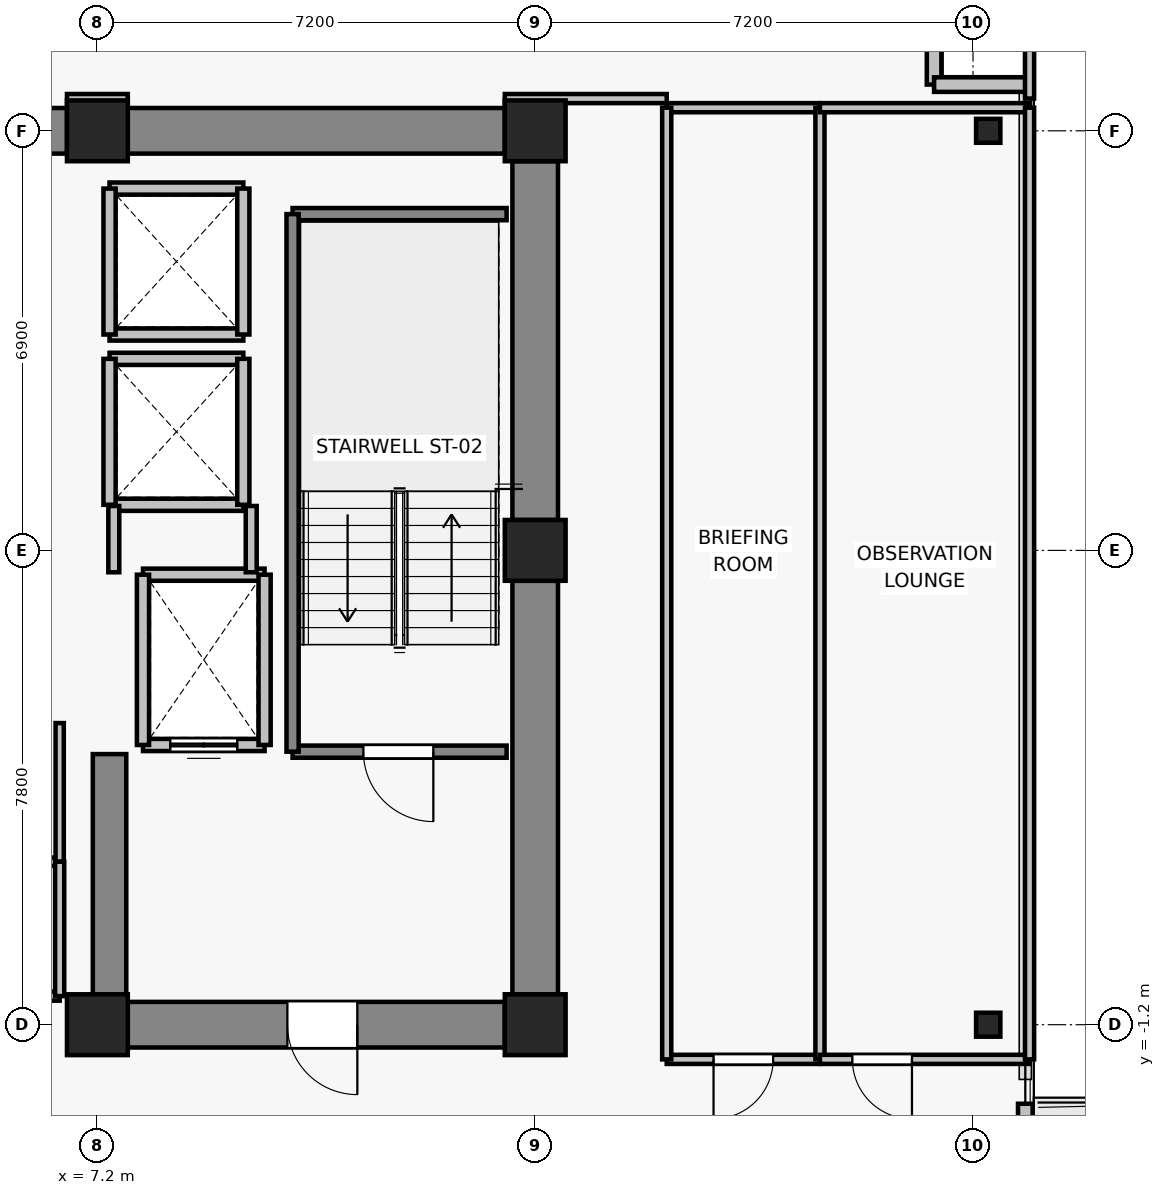
"""IFC4 building model, lengths in metres.
Left out: names, types, materials, properties, quantities, classifications, styles, units other than length and angle.
Written with IfcOpenShell. Run it as: python <this file> out.ifc"""

import sys

from ifc_helpers import new_model, si_unit, direction, frame, frame_2d, origin, origin_2d, place, context, subcontext, project, spatial, rectangle, i_section, extrude, source, transform, mapped, element, fill, save


model = new_model("IFC4")
c1 = context("Model", 3, precision=1e-05, world=origin(), true_north=direction((0.0, 1.0)))
c2 = subcontext(c1, "Body", "Model", "MODEL_VIEW")
j1 = project(units=[si_unit("LENGTHUNIT", "METRE"), si_unit("PLANEANGLEUNIT", "RADIAN")], contexts=[c1])
p1 = place(None, origin())
s1 = spatial("IfcSite", under=j1, at=p1, CompositionType="ELEMENT")
p2 = place(p1, origin())
s2 = spatial("IfcBuilding", under=s1, at=p2, CompositionType="ELEMENT")
p3 = place(p2, frame((0.0, 0.0, 149.5)))
s3 = spatial("IfcBuildingStorey", under=s2, at=p3, CompositionType="ELEMENT", Elevation=149.5)
for number, where, z_axis, x_axis in (
    (1, (7.2, -1.2, 0.0), (0.0, 0.0, 1.0), (1.0, 0.0, 0.0)),
    (2, (14.4, -1.2, 0.0), (0.0, 0.0, 1.0), (1.0, 0.0, 0.0)),
    (3, (14.4, 6.6, 0.0), (0.0, 0.0, 1.0), (1.0, 0.0, 0.0)),
    (4, (7.2, 13.5, 0.0), (0.0, 0.0, 1.0), (1.0, 0.0, 0.0)),
    (5, (14.4, 13.5, 0.0), (0.0, 0.0, 1.0), (1.0, 0.0, 0.0)),
):
    element("IfcColumn", number, at=place(p3, frame(where, z_axis=z_axis, x_axis=x_axis)), inside=s3, PredefinedType="COLUMN", context=c2, shape_type="SweptSolid", body=[
        extrude(rectangle(XDim=1.0, YDim=1.0, at=origin_2d()), origin(), (0.0, 0.0, 1.0), 3.3),
    ])
for number, where, z_axis, x_axis in (
    (6, (21.85, -1.2, 0.0), (0.0, 0.0, 1.0), (1.0, 0.0, 0.0)),
    (7, (21.85, 13.5, 0.0), (0.0, 0.0, 1.0), (1.0, 0.0, 0.0)),
):
    element("IfcColumn", number, at=place(p3, frame(where, z_axis=z_axis, x_axis=x_axis)), inside=s3, PredefinedType="COLUMN", context=c2, shape_type="SweptSolid", body=[
        extrude(i_section(OverallWidth=0.399, OverallDepth=0.394, WebThickness=0.023, FlangeThickness=0.037, FilletRadius=0.015, at=origin_2d()), origin(), (0.0, 0.0, 1.0), 3.3),
    ])
p4 = place(p3, frame((-6.7, 13.5, 0.0), z_axis=(0.0, 0.0, 1.0), x_axis=(1.0, 0.0, 0.0)))
e8 = element("IfcWall", 8, at=p4, inside=s3, PredefinedType="SHEAR", context=c2, shape_type="SweptSolid", body=[
    extrude(rectangle(XDim=13.4, YDim=0.75, at=frame_2d((6.7, 0.0))), origin(), (0.0, 0.0, 1.0), 3.075),
])
p5 = place(p3, frame((7.7, 13.5, 0.0), z_axis=(0.0, 0.0, 1.0), x_axis=(1.0, 0.0, 0.0)))
e9 = element("IfcWall", 9, at=p5, inside=s3, PredefinedType="SHEAR", context=c2, shape_type="SweptSolid", body=[
    extrude(rectangle(XDim=6.2, YDim=0.75, at=frame_2d((3.1, 0.0))), origin(), (0.0, 0.0, 1.0), 3.075),
])
p6 = place(p3, frame((14.4, -0.7, 0.0), z_axis=(0.0, 0.0, 1.0), x_axis=(0.0, 1.0, 0.0)))
e10 = element("IfcWall", 10, at=p6, inside=s3, PredefinedType="SHEAR", context=c2, shape_type="SweptSolid", body=[
    extrude(rectangle(XDim=6.8, YDim=0.75, at=frame_2d((3.4, 0.0))), origin(), (0.0, 0.0, 1.0), 3.075),
])
p7 = place(p3, frame((14.4, 7.1, 0.0), z_axis=(0.0, 0.0, 1.0), x_axis=(0.0, 1.0, 0.0)))
e11 = element("IfcWall", 11, at=p7, inside=s3, PredefinedType="SHEAR", context=c2, shape_type="SweptSolid", body=[
    extrude(rectangle(XDim=5.9, YDim=0.75, at=frame_2d((2.95, 0.0))), origin(), (0.0, 0.0, 1.0), 3.075),
])
p8 = place(p3, frame((13.9, -1.2, 0.0), z_axis=(0.0, 0.0, 1.0), x_axis=(-1.0, 0.0, 0.0)))
e12 = element("IfcWall", 12, at=p8, inside=s3, PredefinedType="SHEAR", context=c2, shape_type="SweptSolid", body=[
    extrude(rectangle(XDim=6.2, YDim=0.75, at=frame_2d((3.1, 0.0))), origin(), (0.0, 0.0, 1.0), 3.075),
])
p9 = place(p8, frame((2.425, 0.0, 0.0)))
e13 = element("IfcOpeningElement", 13, at=p9, cuts=e12, PredefinedType="OPENING", context=c2, shape_type="SweptSolid", body=[
    extrude(rectangle(XDim=1.15, YDim=2.15, at=frame_2d((0.575, 1.075))), frame((0.0, 0.385, 0.0), z_axis=(0.0, -1.0, 0.0), x_axis=(1.0, 0.0, 0.0)), (0.0, 0.0, 1.0), 0.77),
])
p10 = place(p3, frame((7.4, -0.825, 0.0), z_axis=(0.0, 0.0, 1.0), x_axis=(0.0, 1.0, 0.0)))
e14 = element("IfcWall", 14, at=p10, inside=s3, PredefinedType="SHEAR", context=c2, shape_type="SweptSolid", body=[
    extrude(rectangle(XDim=4.075, YDim=0.55, at=frame_2d((2.038, 0.0))), origin(), (0.0, 0.0, 1.0), 3.075),
])
p11 = place(p3, frame((22.46, -2.5, 0.0), z_axis=(0.0, 0.0, 1.0), x_axis=(0.0, -1.0, 0.0)))
e15 = element("IfcWall", 15, at=p11, inside=s3, PredefinedType="SOLIDWALL", context=c2, shape_type="SweptSolid", body=[
    extrude(rectangle(XDim=5.8, YDim=0.24, at=frame_2d((2.9, 0.0))), origin(), (0.0, 0.0, 1.0), 3.075),
])
p12 = place(p11, frame((1.566, 0.0, 0.0)))
e16 = element("IfcOpeningElement", 16, at=p12, cuts=e15, PredefinedType="OPENING", context=c2, shape_type="SweptSolid", body=[
    extrude(rectangle(XDim=1.0, YDim=2.2, at=frame_2d((0.5, 1.1))), frame((0.0, 0.13, 0.0), z_axis=(0.0, -1.0, 0.0), x_axis=(1.0, 0.0, 0.0)), (0.0, 0.0, 1.0), 0.26),
])
p13 = place(p11, frame((2.916, 0.0, 0.85)))
e17 = element("IfcOpeningElement", 17, at=p13, cuts=e15, PredefinedType="OPENING", context=c2, shape_type="SweptSolid", body=[
    extrude(rectangle(XDim=1.2, YDim=1.5, at=frame_2d((0.6, 0.75))), frame((0.0, 0.13, 0.0), z_axis=(0.0, -1.0, 0.0), x_axis=(1.0, 0.0, 0.0)), (0.0, 0.0, 1.0), 0.26),
])
for number, where, z_axis, x_axis in (
    (18, (20.96, 14.26, 0.0), (0.0, 0.0, 1.0), (0.0, 1.0, 0.0)),
    (19, (22.46, 14.26, 0.0), (0.0, 0.0, 1.0), (-1.0, 0.0, 0.0)),
):
    element("IfcWall", number, at=place(p3, frame(where, z_axis=z_axis, x_axis=x_axis)), inside=s3, PredefinedType="SOLIDWALL", context=c2, shape_type="SweptSolid", body=[
        extrude(rectangle(XDim=1.5, YDim=0.24, at=frame_2d((0.75, 0.0))), origin(), (0.0, 0.0, 1.0), 3.075),
    ])
p14 = place(p3, frame((9.95, 3.4, 0.0), z_axis=(0.0, 0.0, 1.0), x_axis=(-1.0, 0.0, 0.0)))
e20 = element("IfcWall", 20, at=p14, inside=s3, PredefinedType="SOLIDWALL", context=c2, shape_type="SweptSolid", body=[
    extrude(rectangle(XDim=2.0, YDim=0.2, at=frame_2d((1.0, 0.0))), origin(), (0.0, 0.0, 1.0), 3.075),
])
p15 = place(p14, frame((0.45, 0.0, 0.0)))
e21 = element("IfcOpeningElement", 21, at=p15, cuts=e20, PredefinedType="OPENING", context=c2, shape_type="SweptSolid", body=[
    extrude(rectangle(XDim=1.1, YDim=2.2, at=frame_2d((0.55, 1.1))), frame((0.0, 0.11, 0.0), z_axis=(0.0, -1.0, 0.0), x_axis=(1.0, 0.0, 0.0)), (0.0, 0.0, 1.0), 0.22),
])
p16 = place(p3, frame((7.95, 6.2, 0.0), z_axis=(0.0, 0.0, 1.0), x_axis=(1.0, 0.0, 0.0)))
e22 = element("IfcWall", 22, at=p16, inside=s3, PredefinedType="SOLIDWALL", context=c2, shape_type="SweptSolid", body=[
    extrude(rectangle(XDim=2.0, YDim=0.2, at=frame_2d((1.0, 0.0))), origin(), (0.0, 0.0, 1.0), 3.075),
])
for number, where, z_axis, x_axis in (
    (23, (7.95, 3.4, 0.0), (0.0, 0.0, 1.0), (0.0, 1.0, 0.0)),
    (24, (9.95, 6.2, 0.0), (0.0, 0.0, 1.0), (0.0, -1.0, 0.0)),
):
    element("IfcWall", number, at=place(p3, frame(where, z_axis=z_axis, x_axis=x_axis)), inside=s3, PredefinedType="SOLIDWALL", context=c2, shape_type="SweptSolid", body=[
        extrude(rectangle(XDim=2.8, YDim=0.2, at=frame_2d((1.4, 0.0))), origin(), (0.0, 0.0, 1.0), 3.075),
    ])
for number, where, z_axis, x_axis in (
    (25, (9.6, 7.35, 0.0), (0.0, 0.0, 1.0), (-1.0, 0.0, 0.0)),
    (26, (7.4, 9.75, 0.0), (0.0, 0.0, 1.0), (1.0, 0.0, 0.0)),
):
    element("IfcWall", number, at=place(p3, frame(where, z_axis=z_axis, x_axis=x_axis)), inside=s3, PredefinedType="SOLIDWALL", context=c2, shape_type="SweptSolid", body=[
        extrude(rectangle(XDim=2.2, YDim=0.2, at=frame_2d((1.1, 0.0))), origin(), (0.0, 0.0, 1.0), 2.565),
    ])
p17 = place(p3, frame((7.4, 7.35, 0.0), z_axis=(0.0, 0.0, 1.0), x_axis=(0.0, 1.0, 0.0)))
e27 = element("IfcWall", 27, at=p17, inside=s3, PredefinedType="SOLIDWALL", context=c2, shape_type="SweptSolid", body=[
    extrude(rectangle(XDim=2.4, YDim=0.2, at=frame_2d((1.2, 0.0))), origin(), (0.0, 0.0, 1.0), 2.565),
])
p18 = place(p3, frame((9.6, 9.75, 0.0), z_axis=(0.0, 0.0, 1.0), x_axis=(0.0, -1.0, 0.0)))
e28 = element("IfcWall", 28, at=p18, inside=s3, PredefinedType="SOLIDWALL", context=c2, shape_type="SweptSolid", body=[
    extrude(rectangle(XDim=2.4, YDim=0.2, at=frame_2d((1.2, 0.0))), origin(), (0.0, 0.0, 1.0), 3.075),
])
for number, where, z_axis, x_axis in (
    (29, (9.6, 10.15, 0.0), (0.0, 0.0, 1.0), (-1.0, 0.0, 0.0)),
    (30, (7.4, 12.55, 0.0), (0.0, 0.0, 1.0), (1.0, 0.0, 0.0)),
):
    element("IfcWall", number, at=place(p3, frame(where, z_axis=z_axis, x_axis=x_axis)), inside=s3, PredefinedType="SOLIDWALL", context=c2, shape_type="SweptSolid", body=[
        extrude(rectangle(XDim=2.2, YDim=0.2, at=frame_2d((1.1, 0.0))), origin(), (0.0, 0.0, 1.0), 2.565),
    ])
p19 = place(p3, frame((7.4, 10.15, 0.0), z_axis=(0.0, 0.0, 1.0), x_axis=(0.0, 1.0, 0.0)))
e31 = element("IfcWall", 31, at=p19, inside=s3, PredefinedType="SOLIDWALL", context=c2, shape_type="SweptSolid", body=[
    extrude(rectangle(XDim=2.4, YDim=0.2, at=frame_2d((1.2, 0.0))), origin(), (0.0, 0.0, 1.0), 2.565),
])
p20 = place(p3, frame((9.6, 12.55, 0.0), z_axis=(0.0, 0.0, 1.0), x_axis=(0.0, -1.0, 0.0)))
e32 = element("IfcWall", 32, at=p20, inside=s3, PredefinedType="SOLIDWALL", context=c2, shape_type="SweptSolid", body=[
    extrude(rectangle(XDim=2.4, YDim=0.2, at=frame_2d((1.2, 0.0))), origin(), (0.0, 0.0, 1.0), 3.075),
])
p21 = place(p3, frame((13.93, 3.29, 0.0), z_axis=(0.0, 0.0, 1.0), x_axis=(-1.0, 0.0, 0.0)))
e33 = element("IfcWall", 33, at=p21, inside=s3, PredefinedType="SOLIDWALL", context=c2, shape_type="SweptSolid", body=[
    extrude(rectangle(XDim=3.52, YDim=0.2, at=frame_2d((1.76, 0.0))), origin(), (0.0, 0.0, 1.0), 3.075),
])
p22 = place(p21, frame((1.205, 0.0, 0.0)))
e34 = element("IfcOpeningElement", 34, at=p22, cuts=e33, PredefinedType="OPENING", context=c2, shape_type="SweptSolid", body=[
    extrude(rectangle(XDim=1.15, YDim=2.15, at=frame_2d((0.575, 1.075))), frame((0.0, 0.11, 0.0), z_axis=(0.0, -1.0, 0.0), x_axis=(1.0, 0.0, 0.0)), (0.0, 0.0, 1.0), 0.22),
])
p23 = place(p3, frame((10.41, 12.13, 0.0), z_axis=(0.0, 0.0, 1.0), x_axis=(1.0, 0.0, 0.0)))
e35 = element("IfcWall", 35, at=p23, inside=s3, PredefinedType="SOLIDWALL", context=c2, shape_type="SweptSolid", body=[
    extrude(rectangle(XDim=3.52, YDim=0.2, at=frame_2d((1.76, 0.0))), origin(), (0.0, 0.0, 1.0), 3.075),
])
p24 = place(p3, frame((10.41, 3.29, 0.0), z_axis=(0.0, 0.0, 1.0), x_axis=(0.0, 1.0, 0.0)))
e36 = element("IfcWall", 36, at=p24, inside=s3, PredefinedType="SOLIDWALL", context=c2, shape_type="SweptSolid", body=[
    extrude(rectangle(XDim=8.84, YDim=0.2, at=frame_2d((4.42, 0.0))), origin(), (0.0, 0.0, 1.0), 3.075),
])
p25 = place(p3, frame((7.47, 6.24, 0.0), z_axis=(0.0, 0.0, 1.0), x_axis=(0.0, 1.0, 0.0)))
e37 = element("IfcWall", 37, at=p25, inside=s3, PredefinedType="PARTITIONING", context=c2, shape_type="SweptSolid", body=[
    extrude(rectangle(XDim=1.09, YDim=0.18, at=frame_2d((0.545, 0.0))), origin(), (0.0, 0.0, 1.0), 2.565),
])
p26 = place(p3, frame((9.73, 7.33, 0.0), z_axis=(0.0, 0.0, 1.0), x_axis=(0.0, -1.0, 0.0)))
e38 = element("IfcWall", 38, at=p26, inside=s3, PredefinedType="PARTITIONING", context=c2, shape_type="SweptSolid", body=[
    extrude(rectangle(XDim=1.09, YDim=0.18, at=frame_2d((0.545, 0.0))), origin(), (0.0, 0.0, 1.0), 3.075),
])
p27 = place(p3, frame((6.58, 1.48, 0.0), z_axis=(0.0, 0.0, 1.0), x_axis=(-1.0, 0.0, 0.0)))
e39 = element("IfcWall", 39, at=p27, inside=s3, PredefinedType="PARTITIONING", context=c2, shape_type="SweptSolid", body=[
    extrude(rectangle(XDim=5.11, YDim=0.135, at=frame_2d((2.555, 0.0))), origin(), (0.0, 0.0, 1.0), 3.075),
])
p28 = place(p3, frame((6.58, 3.76, 0.0), z_axis=(0.0, 0.0, 1.0), x_axis=(0.0, -1.0, 0.0)))
e40 = element("IfcWall", 40, at=p28, inside=s3, PredefinedType="PARTITIONING", context=c2, shape_type="SweptSolid", body=[
    extrude(rectangle(XDim=2.28, YDim=0.135, at=frame_2d((1.14, 0.0))), origin(), (0.0, 0.0, 1.0), 3.075),
])
p29 = place(p3, frame((6.58, -0.73, 0.0), z_axis=(0.0, 0.0, 1.0), x_axis=(-1.0, 0.0, 0.0)))
e41 = element("IfcWall", 41, at=p29, inside=s3, PredefinedType="PARTITIONING", context=c2, shape_type="SweptSolid", body=[
    extrude(rectangle(XDim=2.4, YDim=0.15, at=frame_2d((1.2, 0.0))), origin(), (0.0, 0.0, 1.0), 3.075),
])
p30 = place(p29, frame((0.76, 0.0, 0.0)))
e42 = element("IfcOpeningElement", 42, at=p30, cuts=e41, PredefinedType="OPENING", context=c2, shape_type="SweptSolid", body=[
    extrude(rectangle(XDim=0.88, YDim=2.1, at=frame_2d((0.44, 1.05))), frame((0.0, 0.085, 0.0), z_axis=(0.0, -1.0, 0.0), x_axis=(1.0, 0.0, 0.0)), (0.0, 0.0, 1.0), 0.17),
])
p31 = place(p3, frame((6.58, 1.48, 0.0), z_axis=(0.0, 0.0, 1.0), x_axis=(0.0, -1.0, 0.0)))
e43 = element("IfcWall", 43, at=p31, inside=s3, PredefinedType="PARTITIONING", context=c2, shape_type="SweptSolid", body=[
    extrude(rectangle(XDim=2.21, YDim=0.15, at=frame_2d((1.105, 0.0))), origin(), (0.0, 0.0, 1.0), 3.075),
])
p32 = place(p3, frame((19.083, -1.77, 0.0), z_axis=(0.0, 0.0, 1.0), x_axis=(-1.0, 0.0, 0.0)))
e44 = element("IfcWall", 44, at=p32, inside=s3, PredefinedType="PARTITIONING", context=c2, shape_type="SweptSolid", body=[
    extrude(rectangle(XDim=2.52, YDim=0.15, at=frame_2d((1.26, 0.0))), origin(), (0.0, 0.0, 1.0), 3.075),
])
p33 = place(p32, frame((0.77, 0.0, 0.0)))
e45 = element("IfcOpeningElement", 45, at=p33, cuts=e44, PredefinedType="OPENING", context=c2, shape_type="SweptSolid", body=[
    extrude(rectangle(XDim=0.98, YDim=2.15, at=frame_2d((0.49, 1.075))), frame((0.0, 0.085, 0.0), z_axis=(0.0, -1.0, 0.0), x_axis=(1.0, 0.0, 0.0)), (0.0, 0.0, 1.0), 0.17),
])
p34 = place(p3, frame((16.563, 13.88, 0.0), z_axis=(0.0, 0.0, 1.0), x_axis=(1.0, 0.0, 0.0)))
e46 = element("IfcWall", 46, at=p34, inside=s3, PredefinedType="PARTITIONING", context=c2, shape_type="SweptSolid", body=[
    extrude(rectangle(XDim=2.52, YDim=0.15, at=frame_2d((1.26, 0.0))), origin(), (0.0, 0.0, 1.0), 3.075),
])
for number, where, z_axis, x_axis in (
    (47, (16.563, -1.77, 0.0), (0.0, 0.0, 1.0), (0.0, 1.0, 0.0)),
    (48, (19.083, 13.88, 0.0), (0.0, 0.0, 1.0), (0.0, -1.0, 0.0)),
):
    element("IfcWall", number, at=place(p3, frame(where, z_axis=z_axis, x_axis=x_axis)), inside=s3, PredefinedType="PARTITIONING", context=c2, shape_type="SweptSolid", body=[
        extrude(rectangle(XDim=15.65, YDim=0.15, at=frame_2d((7.825, 0.0))), origin(), (0.0, 0.0, 1.0), 2.565),
    ])
p35 = place(p3, frame((22.53, -1.77, 0.0), z_axis=(0.0, 0.0, 1.0), x_axis=(-1.0, 0.0, 0.0)))
e49 = element("IfcWall", 49, at=p35, inside=s3, PredefinedType="PARTITIONING", context=c2, shape_type="SweptSolid", body=[
    extrude(rectangle(XDim=3.447, YDim=0.15, at=frame_2d((1.724, 0.0))), origin(), (0.0, 0.0, 1.0), 2.565),
])
p36 = place(p35, frame((1.934, 0.0, 0.0)))
e50 = element("IfcOpeningElement", 50, at=p36, cuts=e49, PredefinedType="OPENING", context=c2, shape_type="SweptSolid", body=[
    extrude(rectangle(XDim=0.98, YDim=2.15, at=frame_2d((0.49, 1.075))), frame((0.0, 0.085, 0.0), z_axis=(0.0, -1.0, 0.0), x_axis=(1.0, 0.0, 0.0)), (0.0, 0.0, 1.0), 0.17),
])
p37 = place(p3, frame((19.083, 13.88, 0.0), z_axis=(0.0, 0.0, 1.0), x_axis=(1.0, 0.0, 0.0)))
e51 = element("IfcWall", 51, at=p37, inside=s3, PredefinedType="PARTITIONING", context=c2, shape_type="SweptSolid", body=[
    extrude(rectangle(XDim=3.447, YDim=0.15, at=frame_2d((1.724, 0.0))), origin(), (0.0, 0.0, 1.0), 3.075),
])
p38 = place(p3, frame((22.53, 13.88, 0.0), z_axis=(0.0, 0.0, 1.0), x_axis=(0.0, -1.0, 0.0)))
e52 = element("IfcWall", 52, at=p38, inside=s3, PredefinedType="PARTITIONING", context=c2, shape_type="SweptSolid", body=[
    extrude(rectangle(XDim=15.65, YDim=0.15, at=frame_2d((7.825, 0.0))), origin(), (0.0, 0.0, 1.0), 3.075),
])
p39 = place(p3, frame((7.7, 14.03, 0.0), z_axis=(0.0, 0.0, 1.0), x_axis=(-1.0, 0.0, 0.0)))
e53 = element("IfcWall", 53, at=p39, inside=s3, PredefinedType="PARTITIONING", context=c2, shape_type="SweptSolid", body=[
    extrude(rectangle(XDim=1.0, YDim=0.15, at=frame_2d((0.5, 0.0))), origin(), (0.0, 0.0, 1.0), 2.565),
])
p40 = place(p3, frame((16.563, 14.03, 0.0), z_axis=(0.0, 0.0, 1.0), x_axis=(-1.0, 0.0, 0.0)))
e54 = element("IfcWall", 54, at=p40, inside=s3, PredefinedType="PARTITIONING", context=c2, shape_type="SweptSolid", body=[
    extrude(rectangle(XDim=2.663, YDim=0.15, at=frame_2d((1.332, 0.0))), origin(), (0.0, 0.0, 1.0), 2.565),
])
p41 = place(p3, frame((22.53, 17.33, 0.0), z_axis=(0.0, 0.0, 1.0), x_axis=(0.0, -1.0, 0.0)))
e55 = element("IfcWall", 55, at=p41, inside=s3, PredefinedType="PARTITIONING", context=c2, shape_type="SweptSolid", body=[
    extrude(rectangle(XDim=3.3, YDim=0.15, at=frame_2d((1.65, 0.0))), origin(), (0.0, 0.0, 1.0), 3.075),
])
m1 = source(origin(), c2, "Body", "SweptSolid", [
    extrude(rectangle(XDim=1.1, YDim=2.2, at=frame_2d((0.55, 1.1))), frame((0.0, 0.025, 0.0), z_axis=(0.0, -1.0, 0.0), x_axis=(1.0, 0.0, 0.0)), (0.0, 0.0, 1.0), 0.05),
])
p42 = place(p15, origin())
e56 = element("IfcDoor", 56, at=p42, inside=s3, OperationType="DOUBLE_DOOR_SLIDING", PredefinedType="DOOR", context=c2, shape_type="MappedRepresentation", body=[
    mapped(m1, transform((0.0, 0.0, 0.0), x_axis=(1.0, 0.0, 0.0), y_axis=(0.0, 1.0, 0.0), z_axis=(0.0, 0.0, 1.0), scale=1.0)),
])
fill(e21, e56)
m2 = source(origin(), c2, "Body", "SweptSolid", [
    extrude(rectangle(XDim=1.15, YDim=2.15, at=frame_2d((0.575, 1.075))), frame((0.0, 0.025, 0.0), z_axis=(0.0, -1.0, 0.0), x_axis=(1.0, 0.0, 0.0)), (0.0, 0.0, 1.0), 0.05),
])
p43 = place(p22, origin())
e57 = element("IfcDoor", 57, at=p43, inside=s3, OperationType="SINGLE_SWING_LEFT", PredefinedType="DOOR", context=c2, shape_type="MappedRepresentation", body=[
    mapped(m2, transform((0.0, 0.0, 0.0), x_axis=(1.0, 0.0, 0.0), y_axis=(0.0, 1.0, 0.0), z_axis=(0.0, 0.0, 1.0), scale=1.0)),
])
fill(e34, e57)
p44 = place(p9, origin())
e58 = element("IfcDoor", 58, at=p44, inside=s3, OperationType="SINGLE_SWING_LEFT", PredefinedType="DOOR", context=c2, shape_type="MappedRepresentation", body=[
    mapped(m2, transform((0.0, 0.0, 0.0), x_axis=(1.0, 0.0, 0.0), y_axis=(0.0, 1.0, 0.0), z_axis=(0.0, 0.0, 1.0), scale=1.0)),
])
fill(e13, e58)
m3 = source(origin(), c2, "Body", "SweptSolid", [
    extrude(rectangle(XDim=0.98, YDim=2.15, at=frame_2d((0.49, 1.075))), frame((0.0, 0.025, 0.0), z_axis=(0.0, -1.0, 0.0), x_axis=(1.0, 0.0, 0.0)), (0.0, 0.0, 1.0), 0.05),
])
p45 = place(p33, origin())
e59 = element("IfcDoor", 59, at=p45, inside=s3, OperationType="SINGLE_SWING_RIGHT", PredefinedType="DOOR", context=c2, shape_type="MappedRepresentation", body=[
    mapped(m3, transform((0.0, 0.0, 0.0), x_axis=(1.0, 0.0, 0.0), y_axis=(0.0, 1.0, 0.0), z_axis=(0.0, 0.0, 1.0), scale=1.0)),
])
fill(e45, e59)
p46 = place(p36, origin())
e60 = element("IfcDoor", 60, at=p46, inside=s3, OperationType="SINGLE_SWING_LEFT", PredefinedType="DOOR", context=c2, shape_type="MappedRepresentation", body=[
    mapped(m3, transform((0.0, 0.0, 0.0), x_axis=(1.0, 0.0, 0.0), y_axis=(0.0, 1.0, 0.0), z_axis=(0.0, 0.0, 1.0), scale=1.0)),
])
fill(e50, e60)
save(model, sys.argv[1])
